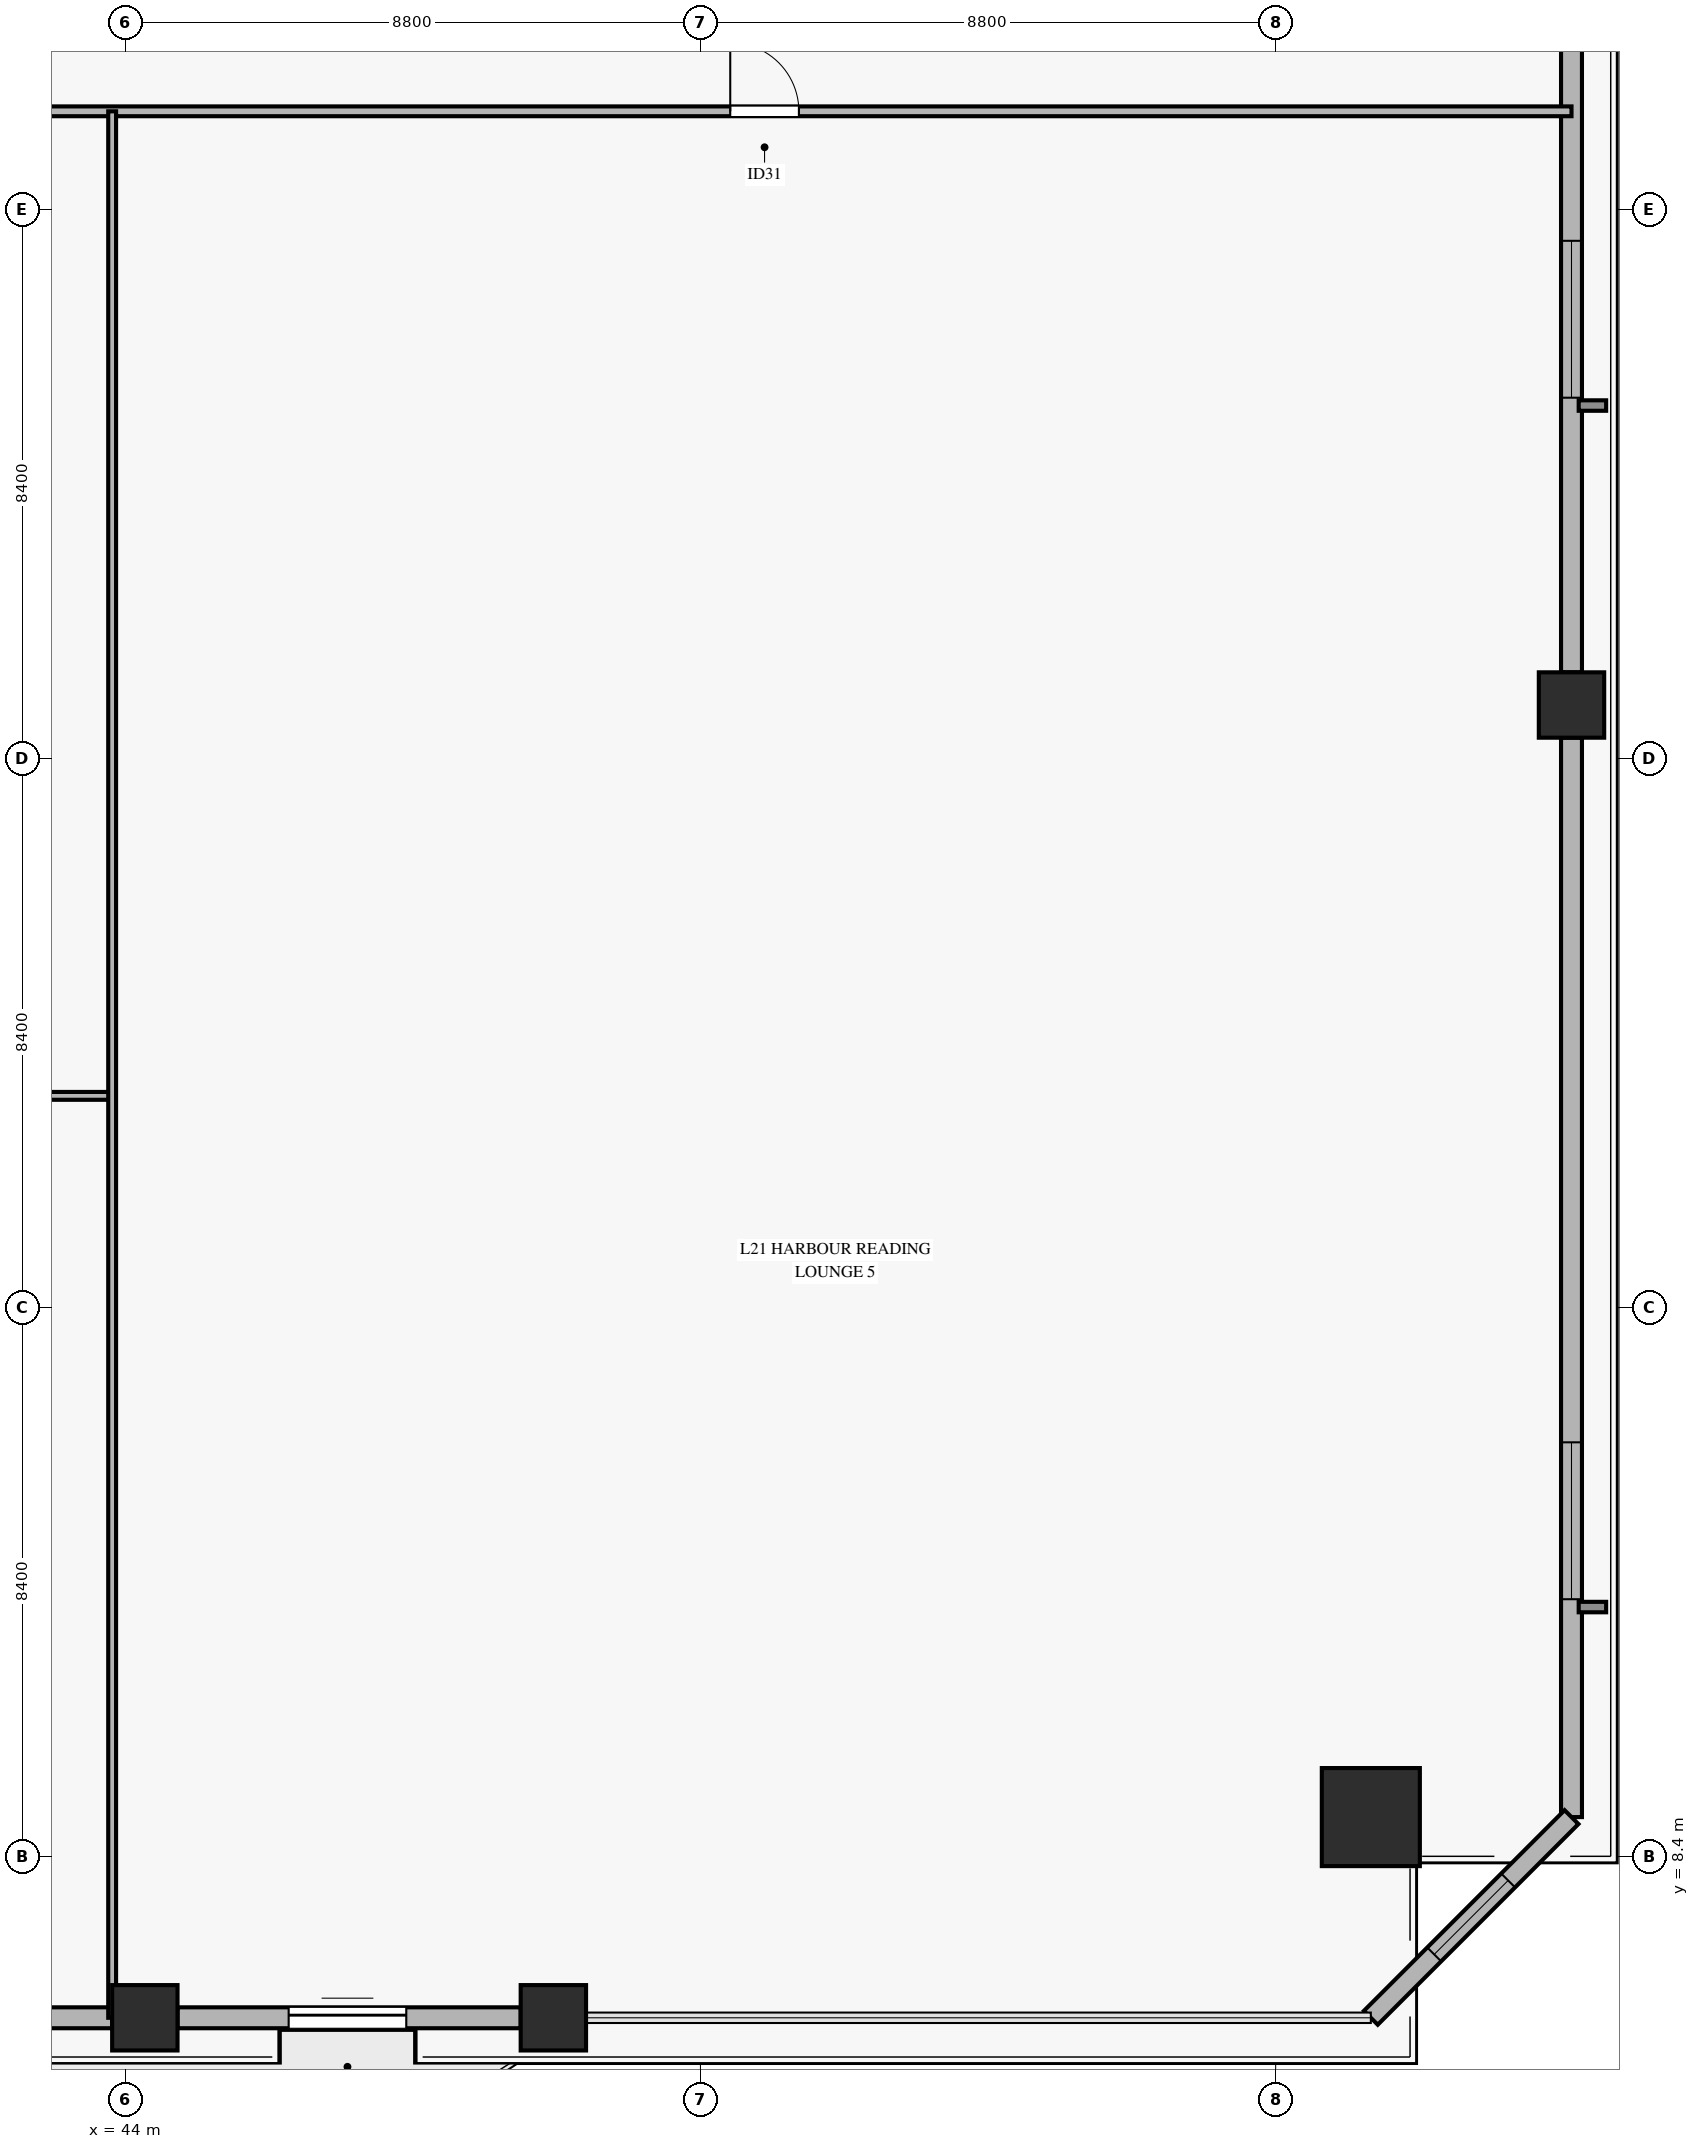
"""IFC4 building model, lengths in metres.
Left out: names, types, materials, properties, quantities, classifications, styles, units other than length and angle.
Written with IfcOpenShell. Run it as: python <this file> out.ifc"""

import sys

from ifc_helpers import new_model, si_unit, direction, frame, frame_2d, origin, origin_2d, place, context, subcontext, project, spatial, rectangle, hollow_rectangle, extrude, source, transform, mapped, element, fill, save


model = new_model("IFC4")
c1 = context("Model", 3, precision=1e-05, world=origin(), true_north=direction((0.0, 1.0)))
c2 = subcontext(c1, "Body", "Model", "MODEL_VIEW")
j1 = project(units=[si_unit("LENGTHUNIT", "METRE"), si_unit("PLANEANGLEUNIT", "RADIAN")], contexts=[c1])
p1 = place(None, origin())
s1 = spatial("IfcSite", under=j1, at=p1, CompositionType="ELEMENT")
p2 = place(p1, origin())
s2 = spatial("IfcBuilding", under=s1, at=p2, CompositionType="ELEMENT")
p3 = place(p2, frame((0.0, 0.0, 87.4)))
s3 = spatial("IfcBuildingStorey", under=s2, at=p3, CompositionType="ELEMENT", Elevation=87.4)
m1 = source(origin(), c2, "Body", "SweptSolid", [
    extrude(hollow_rectangle(XDim=1.5, YDim=1.5, WallThickness=0.07, at=origin_2d()), origin(), (0.0, 0.0, 1.0), 3.68),
])
p4 = place(p3, frame((63.056, 9.006, 0.0), z_axis=(0.0, 0.0, 1.0), x_axis=(1.0, 0.0, 0.0)))
e1 = element("IfcColumn", 1, at=p4, inside=s3, PredefinedType="COLUMN", context=c2, shape_type="MappedRepresentation", body=[
    mapped(m1, transform((0.0, 0.0, 0.0), x_axis=(1.0, 0.0, 0.0), y_axis=(0.0, 1.0, 0.0), z_axis=(0.0, 0.0, 1.0), scale=1.0)),
])
m2 = source(origin(), c2, "Body", "SweptSolid", [
    extrude(hollow_rectangle(XDim=1.0, YDim=1.0, WallThickness=0.045, at=origin_2d()), origin(), (0.0, 0.0, 1.0), 3.68),
])
for number, where, z_axis, x_axis in (
    (2, (44.3, 5.936, 0.0), (0.0, 0.0, 1.0), (1.0, 0.0, 0.0)),
    (3, (50.55, 5.936, 0.0), (0.0, 0.0, 1.0), (1.0, 0.0, 0.0)),
    (4, (66.126, 26.018, 0.0), (0.0, 0.0, 1.0), (1.0, 0.0, 0.0)),
):
    element("IfcColumn", number, at=place(p3, frame(where, z_axis=z_axis, x_axis=x_axis)), inside=s3, PredefinedType="COLUMN", context=c2, shape_type="MappedRepresentation", body=[
        mapped(m2, transform((0.0, 0.0, 0.0), x_axis=(1.0, 0.0, 0.0), y_axis=(0.0, 1.0, 0.0), z_axis=(0.0, 0.0, 1.0), scale=1.0)),
    ])
p5 = place(p3, frame((38.05, 5.936, 0.0), z_axis=(0.0, 0.0, 1.0), x_axis=(1.0, 0.0, 0.0)))
e5 = element("IfcWall", 5, at=p5, inside=s3, PredefinedType="SOLIDWALL", context=c2, shape_type="SweptSolid", body=[
    extrude(rectangle(XDim=5.75, YDim=0.32, at=frame_2d((2.875, 0.0))), origin(), (0.0, 0.0, 1.0), 3.16),
])
p6 = place(p3, frame((44.8, 5.936, 0.0), z_axis=(0.0, 0.0, 1.0), x_axis=(1.0, 0.0, 0.0)))
e6 = element("IfcWall", 6, at=p6, inside=s3, PredefinedType="SOLIDWALL", context=c2, shape_type="SweptSolid", body=[
    extrude(rectangle(XDim=5.25, YDim=0.32, at=frame_2d((2.625, 0.0))), origin(), (0.0, 0.0, 1.0), 3.16),
])
p7 = place(p6, frame((1.7, 0.0, 0.0)))
e7 = element("IfcOpeningElement", 7, at=p7, cuts=e6, PredefinedType="OPENING", context=c2, shape_type="SweptSolid", body=[
    extrude(rectangle(XDim=1.8, YDim=2.25, at=frame_2d((0.9, 1.125))), frame((0.0, 0.17, 0.0), z_axis=(0.0, -1.0, 0.0), x_axis=(1.0, 0.0, 0.0)), (0.0, 0.0, 1.0), 0.34),
])
p8 = place(p3, frame((66.126, 9.006, 0.0), z_axis=(0.0, 0.0, 1.0), x_axis=(0.0, 1.0, 0.0)))
e8 = element("IfcWall", 8, at=p8, inside=s3, PredefinedType="SOLIDWALL", context=c2, shape_type="SweptSolid", body=[
    extrude(rectangle(XDim=16.512, YDim=0.32, at=frame_2d((8.256, 0.0))), origin(), (0.0, 0.0, 1.0), 3.16),
])
p9 = place(p8, frame((3.333, 0.0, 0.45)))
e9 = element("IfcOpeningElement", 9, at=p9, cuts=e8, PredefinedType="OPENING", context=c2, shape_type="SweptSolid", body=[
    extrude(rectangle(XDim=2.4, YDim=2.1, at=frame_2d((1.2, 1.05))), frame((0.0, 0.17, 0.0), z_axis=(0.0, -1.0, 0.0), x_axis=(1.0, 0.0, 0.0)), (0.0, 0.0, 1.0), 0.34),
])
p10 = place(p3, frame((66.126, 26.518, 0.0), z_axis=(0.0, 0.0, 1.0), x_axis=(0.0, 1.0, 0.0)))
e10 = element("IfcWall", 10, at=p10, inside=s3, PredefinedType="SOLIDWALL", context=c2, shape_type="SweptSolid", body=[
    extrude(rectangle(XDim=16.512, YDim=0.32, at=frame_2d((8.256, 0.0))), origin(), (0.0, 0.0, 1.0), 3.16),
])
p11 = place(p10, frame((4.201, 0.0, 0.45)))
e11 = element("IfcOpeningElement", 11, at=p11, cuts=e10, PredefinedType="OPENING", context=c2, shape_type="SweptSolid", body=[
    extrude(rectangle(XDim=2.4, YDim=2.1, at=frame_2d((1.2, 1.05))), frame((0.0, 0.17, 0.0), z_axis=(0.0, -1.0, 0.0), x_axis=(1.0, 0.0, 0.0)), (0.0, 0.0, 1.0), 0.34),
])
p12 = place(p3, frame((63.056, 5.936, 0.0), z_axis=(0.0, 0.0, 1.0), x_axis=(0.707106781187, 0.707106781187, 0.0)))
e12 = element("IfcWall", 12, at=p12, inside=s3, PredefinedType="SOLIDWALL", context=c2, shape_type="SweptSolid", body=[
    extrude(rectangle(XDim=4.342, YDim=0.3, at=frame_2d((2.171, 0.0))), origin(), (0.0, 0.0, 1.0), 3.16),
])
p13 = place(p12, frame((1.371, 0.0, 0.45)))
e13 = element("IfcOpeningElement", 13, at=p13, cuts=e12, PredefinedType="OPENING", context=c2, shape_type="SweptSolid", body=[
    extrude(rectangle(XDim=1.6, YDim=2.0, at=frame_2d((0.8, 1.0))), frame((0.0, 0.16, 0.0), z_axis=(0.0, -1.0, 0.0), x_axis=(1.0, 0.0, 0.0)), (0.0, 0.0, 1.0), 0.32),
])
p14 = place(p3, frame((4.275, 35.1, 0.0), z_axis=(0.0, 0.0, 1.0), x_axis=(1.0, 0.0, 0.0)))
e14 = element("IfcWall", 14, at=p14, inside=s3, PredefinedType="PARTITIONING", context=c2, shape_type="SweptSolid", body=[
    extrude(rectangle(XDim=61.851, YDim=0.15, at=frame_2d((30.926, 0.0))), origin(), (0.0, 0.0, 1.0), 2.765),
])
p15 = place(p14, frame((8.227, 0.0, 0.0)))
e15 = element("IfcOpeningElement", 15, at=p15, cuts=e14, PredefinedType="OPENING", context=c2, shape_type="SweptSolid", body=[
    extrude(rectangle(XDim=1.05, YDim=2.15, at=frame_2d((0.525, 1.075))), frame((0.0, 0.085, 0.0), z_axis=(0.0, -1.0, 0.0), x_axis=(1.0, 0.0, 0.0)), (0.0, 0.0, 1.0), 0.17),
])
p16 = place(p14, frame((21.731, 0.0, 0.0)))
e16 = element("IfcOpeningElement", 16, at=p16, cuts=e14, PredefinedType="OPENING", context=c2, shape_type="SweptSolid", body=[
    extrude(rectangle(XDim=1.05, YDim=2.15, at=frame_2d((0.525, 1.075))), frame((0.0, 0.085, 0.0), z_axis=(0.0, -1.0, 0.0), x_axis=(1.0, 0.0, 0.0)), (0.0, 0.0, 1.0), 0.17),
])
p17 = place(p14, frame((28.411, 0.0, 0.0)))
e17 = element("IfcOpeningElement", 17, at=p17, cuts=e14, PredefinedType="OPENING", context=c2, shape_type="SweptSolid", body=[
    extrude(rectangle(XDim=1.05, YDim=2.15, at=frame_2d((0.525, 1.075))), frame((0.0, 0.085, 0.0), z_axis=(0.0, -1.0, 0.0), x_axis=(1.0, 0.0, 0.0)), (0.0, 0.0, 1.0), 0.17),
])
p18 = place(p14, frame((35.371, 0.0, 0.0)))
e18 = element("IfcOpeningElement", 18, at=p18, cuts=e14, PredefinedType="OPENING", context=c2, shape_type="SweptSolid", body=[
    extrude(rectangle(XDim=1.05, YDim=2.15, at=frame_2d((0.525, 1.075))), frame((0.0, 0.085, 0.0), z_axis=(0.0, -1.0, 0.0), x_axis=(1.0, 0.0, 0.0)), (0.0, 0.0, 1.0), 0.17),
])
p19 = place(p14, frame((48.981, 0.0, 0.0)))
e19 = element("IfcOpeningElement", 19, at=p19, cuts=e14, PredefinedType="OPENING", context=c2, shape_type="SweptSolid", body=[
    extrude(rectangle(XDim=1.05, YDim=2.15, at=frame_2d((0.525, 1.075))), frame((0.0, 0.085, 0.0), z_axis=(0.0, -1.0, 0.0), x_axis=(1.0, 0.0, 0.0)), (0.0, 0.0, 1.0), 0.17),
])
p20 = place(p3, frame((36.6, 20.039, 0.0), z_axis=(0.0, 0.0, 1.0), x_axis=(1.0, 0.0, 0.0)))
e20 = element("IfcWall", 20, at=p20, inside=s3, PredefinedType="PARTITIONING", context=c2, shape_type="SweptSolid", body=[
    extrude(rectangle(XDim=7.2, YDim=0.12, at=frame_2d((3.6, 0.0))), origin(), (0.0, 0.0, 1.0), 2.765),
])
p21 = place(p20, frame((3.187, 0.0, 0.0)))
e21 = element("IfcOpeningElement", 21, at=p21, cuts=e20, PredefinedType="OPENING", context=c2, shape_type="SweptSolid", body=[
    extrude(rectangle(XDim=0.95, YDim=2.1, at=frame_2d((0.475, 1.05))), frame((0.0, 0.07, 0.0), z_axis=(0.0, -1.0, 0.0), x_axis=(1.0, 0.0, 0.0)), (0.0, 0.0, 1.0), 0.14),
])
p22 = place(p3, frame((43.8, 5.936, 0.0), z_axis=(0.0, 0.0, 1.0), x_axis=(0.0, 1.0, 0.0)))
e22 = element("IfcWall", 22, at=p22, inside=s3, PredefinedType="PARTITIONING", context=c2, shape_type="SweptSolid", body=[
    extrude(rectangle(XDim=29.164, YDim=0.12, at=frame_2d((14.582, 0.0))), origin(), (0.0, 0.0, 1.0), 3.215),
])
m3 = source(origin(), c2, "Body", "SweptSolid", [
    extrude(rectangle(XDim=1.8, YDim=2.25, at=frame_2d((0.9, 1.125))), frame((0.0, 0.025, 0.0), z_axis=(0.0, -1.0, 0.0), x_axis=(1.0, 0.0, 0.0)), (0.0, 0.0, 1.0), 0.05),
])
p23 = place(p7, origin())
e23 = element("IfcDoor", 23, at=p23, inside=s3, OperationType="SLIDING_TO_LEFT", PredefinedType="DOOR", context=c2, shape_type="MappedRepresentation", body=[
    mapped(m3, transform((0.0, 0.0, 0.0), x_axis=(1.0, 0.0, 0.0), y_axis=(0.0, 1.0, 0.0), z_axis=(0.0, 0.0, 1.0), scale=1.0)),
])
fill(e7, e23)
m4 = source(origin(), c2, "Body", "SweptSolid", [
    extrude(rectangle(XDim=2.4, YDim=2.1, at=frame_2d((1.2, 1.05))), frame((0.0, 0.03, 0.0), z_axis=(0.0, -1.0, 0.0), x_axis=(1.0, 0.0, 0.0)), (0.0, 0.0, 1.0), 0.06),
])
p24 = place(p9, origin())
e24 = element("IfcWindow", 24, at=p24, inside=s3, PartitioningType="SINGLE_PANEL", PredefinedType="WINDOW", context=c2, shape_type="MappedRepresentation", body=[
    mapped(m4, transform((0.0, 0.0, 0.0), x_axis=(1.0, 0.0, 0.0), y_axis=(0.0, 1.0, 0.0), z_axis=(0.0, 0.0, 1.0), scale=1.0)),
])
fill(e9, e24)
p25 = place(p11, origin())
e25 = element("IfcWindow", 25, at=p25, inside=s3, PartitioningType="SINGLE_PANEL", PredefinedType="WINDOW", context=c2, shape_type="MappedRepresentation", body=[
    mapped(m4, transform((0.0, 0.0, 0.0), x_axis=(1.0, 0.0, 0.0), y_axis=(0.0, 1.0, 0.0), z_axis=(0.0, 0.0, 1.0), scale=1.0)),
])
fill(e11, e25)
m5 = source(origin(), c2, "Body", "SweptSolid", [
    extrude(rectangle(XDim=1.6, YDim=2.0, at=frame_2d((0.8, 1.0))), frame((0.0, 0.03, 0.0), z_axis=(0.0, -1.0, 0.0), x_axis=(1.0, 0.0, 0.0)), (0.0, 0.0, 1.0), 0.06),
])
p26 = place(p13, origin())
e26 = element("IfcWindow", 26, at=p26, inside=s3, PartitioningType="SINGLE_PANEL", PredefinedType="WINDOW", context=c2, shape_type="MappedRepresentation", body=[
    mapped(m5, transform((0.0, 0.0, 0.0), x_axis=(1.0, 0.0, 0.0), y_axis=(0.0, 1.0, 0.0), z_axis=(0.0, 0.0, 1.0), scale=1.0)),
])
fill(e13, e26)
m6 = source(origin(), c2, "Body", "SweptSolid", [
    extrude(rectangle(XDim=1.05, YDim=2.15, at=frame_2d((0.525, 1.075))), frame((0.0, 0.025, 0.0), z_axis=(0.0, -1.0, 0.0), x_axis=(1.0, 0.0, 0.0)), (0.0, 0.0, 1.0), 0.05),
])
p27 = place(p19, origin())
e27 = element("IfcDoor", 27, at=p27, inside=s3, OperationType="SINGLE_SWING_LEFT", PredefinedType="DOOR", context=c2, shape_type="MappedRepresentation", body=[
    mapped(m6, transform((0.0, 0.0, 0.0), x_axis=(1.0, 0.0, 0.0), y_axis=(0.0, 1.0, 0.0), z_axis=(0.0, 0.0, 1.0), scale=1.0)),
])
fill(e19, e27)
save(model, sys.argv[1])
